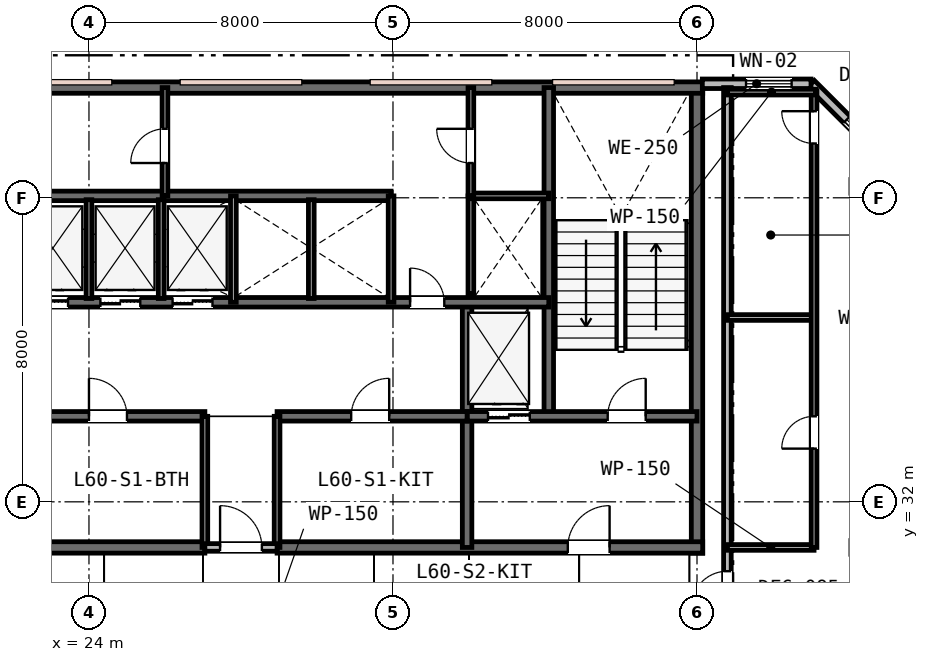
"""IFC4 building model, lengths in metres.
Left out: names, types, materials, properties, quantities, classifications, styles, units other than length and angle.
Written with IfcOpenShell. Run it as: python <this file> out.ifc"""

import sys

from ifc_helpers import new_model, si_unit, direction, frame, frame_2d, origin, place, context, subcontext, project, spatial, rectangle, extrude, element, fill, save


model = new_model("IFC4")
c1 = context("Model", 3, precision=1e-05, world=origin(), true_north=direction((0.0, 1.0)))
c2 = subcontext(c1, "Body", "Model", "MODEL_VIEW")
j1 = project(units=[si_unit("LENGTHUNIT", "METRE"), si_unit("PLANEANGLEUNIT", "RADIAN")], contexts=[c1])
p1 = place(None, origin())
s1 = spatial("IfcSite", under=j1, at=p1, CompositionType="ELEMENT")
p2 = place(p1, origin())
s2 = spatial("IfcBuilding", under=s1, at=p2, CompositionType="ELEMENT")
p3 = place(p2, frame((0.0, 0.0, 233.6)))
s3 = spatial("IfcBuildingStorey", under=s2, at=p3, CompositionType="ELEMENT", Elevation=233.6)
p4 = place(p3, frame((40.0, 30.65, 0.0), z_axis=(0.0, 0.0, 1.0), x_axis=(0.0, 1.0, 0.0)))
e1 = element("IfcWall", 1, at=p4, inside=s3, PredefinedType="SHEAR", context=c2, shape_type="SweptSolid", body=[
    extrude(rectangle(XDim=12.3, YDim=0.3, at=frame_2d((6.15, 0.0))), origin(), (0.0, 0.0, 1.0), 3.8),
])
p5 = place(p3, frame((15.85, 42.9, 0.0), z_axis=(0.0, 0.0, 1.0), x_axis=(1.0, 0.0, 0.0)))
e2 = element("IfcWall", 2, at=p5, inside=s3, PredefinedType="SHEAR", context=c2, shape_type="SweptSolid", body=[
    extrude(rectangle(XDim=24.3, YDim=0.3, at=frame_2d((12.15, 0.0))), origin(), (0.0, 0.0, 1.0), 3.8),
])
p6 = place(p3, frame((15.85, 30.8, 0.0), z_axis=(0.0, 0.0, 1.0), x_axis=(1.0, 0.0, 0.0)))
e3 = element("IfcWall", 3, at=p6, inside=s3, PredefinedType="SHEAR", context=c2, shape_type="SweptSolid", body=[
    extrude(rectangle(XDim=11.2, YDim=0.3, at=frame_2d((5.6, 0.0))), origin(), (0.0, 0.0, 1.0), 3.8),
])
p7 = place(p6, frame((2.45, 0.0, 0.0)))
e4 = element("IfcOpeningElement", 4, at=p7, cuts=e3, PredefinedType="OPENING", context=c2, shape_type="SweptSolid", body=[
    extrude(rectangle(XDim=1.1, YDim=2.15, at=frame_2d((0.55, 1.075))), frame((0.0, 0.16, 0.0), z_axis=(0.0, -1.0, 0.0), x_axis=(1.0, 0.0, 0.0)), (0.0, 0.0, 1.0), 0.32),
])
p8 = place(p3, frame((28.95, 30.8, 0.0), z_axis=(0.0, 0.0, 1.0), x_axis=(1.0, 0.0, 0.0)))
e5 = element("IfcWall", 5, at=p8, inside=s3, PredefinedType="SHEAR", context=c2, shape_type="SweptSolid", body=[
    extrude(rectangle(XDim=11.2, YDim=0.3, at=frame_2d((5.6, 0.0))), origin(), (0.0, 0.0, 1.0), 3.8),
])
p9 = place(p8, frame((7.65, 0.0, 0.0)))
e6 = element("IfcOpeningElement", 6, at=p9, cuts=e5, PredefinedType="OPENING", context=c2, shape_type="SweptSolid", body=[
    extrude(rectangle(XDim=1.1, YDim=2.15, at=frame_2d((0.55, 1.075))), frame((0.0, 0.16, 0.0), z_axis=(0.0, -1.0, 0.0), x_axis=(1.0, 0.0, 0.0)), (0.0, 0.0, 1.0), 0.32),
])
p10 = place(p3, frame((36.1, 34.25, 0.0), z_axis=(0.0, 0.0, 1.0), x_axis=(0.0, 1.0, 0.0)))
e7 = element("IfcWall", 7, at=p10, inside=s3, PredefinedType="SHEAR", context=c2, shape_type="SweptSolid", body=[
    extrude(rectangle(XDim=8.65, YDim=0.25, at=frame_2d((4.325, 0.0))), origin(), (0.0, 0.0, 1.0), 3.8),
])
p11 = place(p3, frame((33.95, 30.8, 0.0), z_axis=(0.0, 0.0, 1.0), x_axis=(0.0, 1.0, 0.0)))
e8 = element("IfcWall", 8, at=p11, inside=s3, PredefinedType="SHEAR", context=c2, shape_type="SweptSolid", body=[
    extrude(rectangle(XDim=6.45, YDim=0.25, at=frame_2d((3.225, 0.0))), origin(), (0.0, 0.0, 1.0), 3.8),
])
p12 = place(p3, frame((33.95, 34.25, 0.0), z_axis=(0.0, 0.0, 1.0), x_axis=(1.0, 0.0, 0.0)))
e9 = element("IfcWall", 9, at=p12, inside=s3, PredefinedType="SHEAR", context=c2, shape_type="SweptSolid", body=[
    extrude(rectangle(XDim=6.05, YDim=0.25, at=frame_2d((3.025, 0.0))), origin(), (0.0, 0.0, 1.0), 3.8),
])
p13 = place(p12, frame((3.7, 0.0, 0.0)))
e10 = element("IfcOpeningElement", 10, at=p13, cuts=e9, PredefinedType="OPENING", context=c2, shape_type="SweptSolid", body=[
    extrude(rectangle(XDim=1.0, YDim=2.15, at=frame_2d((0.5, 1.075))), frame((0.0, 0.135, 0.0), z_axis=(0.0, -1.0, 0.0), x_axis=(1.0, 0.0, 0.0)), (0.0, 0.0, 1.0), 0.27),
])
p14 = place(p12, frame((0.55, 0.0, 0.0)))
e11 = element("IfcOpeningElement", 11, at=p14, cuts=e9, PredefinedType="OPENING", context=c2, shape_type="SweptSolid", body=[
    extrude(rectangle(XDim=1.1, YDim=2.15, at=frame_2d((0.55, 1.075))), frame((0.0, 0.135, 0.0), z_axis=(0.0, -1.0, 0.0), x_axis=(1.0, 0.0, 0.0)), (0.0, 0.0, 1.0), 0.27),
])
p15 = place(p3, frame((22.05, 34.25, 0.0), z_axis=(0.0, 0.0, 1.0), x_axis=(1.0, 0.0, 0.0)))
e12 = element("IfcWall", 12, at=p15, inside=s3, PredefinedType="SHEAR", context=c2, shape_type="SweptSolid", body=[
    extrude(rectangle(XDim=5.0, YDim=0.25, at=frame_2d((2.5, 0.0))), origin(), (0.0, 0.0, 1.0), 3.8),
])
p16 = place(p15, frame((1.95, 0.0, 0.0)))
e13 = element("IfcOpeningElement", 13, at=p16, cuts=e12, PredefinedType="OPENING", context=c2, shape_type="SweptSolid", body=[
    extrude(rectangle(XDim=1.0, YDim=2.15, at=frame_2d((0.5, 1.075))), frame((0.0, 0.135, 0.0), z_axis=(0.0, -1.0, 0.0), x_axis=(1.0, 0.0, 0.0)), (0.0, 0.0, 1.0), 0.27),
])
p17 = place(p3, frame((28.95, 34.25, 0.0), z_axis=(0.0, 0.0, 1.0), x_axis=(1.0, 0.0, 0.0)))
e14 = element("IfcWall", 14, at=p17, inside=s3, PredefinedType="SHEAR", context=c2, shape_type="SweptSolid", body=[
    extrude(rectangle(XDim=5.0, YDim=0.25, at=frame_2d((2.5, 0.0))), origin(), (0.0, 0.0, 1.0), 3.8),
])
p18 = place(p17, frame((1.95, 0.0, 0.0)))
e15 = element("IfcOpeningElement", 15, at=p18, cuts=e14, PredefinedType="OPENING", context=c2, shape_type="SweptSolid", body=[
    extrude(rectangle(XDim=1.0, YDim=2.15, at=frame_2d((0.5, 1.075))), frame((0.0, 0.135, 0.0), z_axis=(0.0, -1.0, 0.0), x_axis=(1.0, 0.0, 0.0)), (0.0, 0.0, 1.0), 0.27),
])
p19 = place(p3, frame((19.9, 37.25, 0.0), z_axis=(0.0, 0.0, 1.0), x_axis=(1.0, 0.0, 0.0)))
e16 = element("IfcWall", 16, at=p19, inside=s3, PredefinedType="SHEAR", context=c2, shape_type="SweptSolid", body=[
    extrude(rectangle(XDim=16.2, YDim=0.25, at=frame_2d((8.1, 0.0))), origin(), (0.0, 0.0, 1.0), 3.8),
])
p20 = place(p19, frame((12.55, 0.0, 0.0)))
e17 = element("IfcOpeningElement", 17, at=p20, cuts=e16, PredefinedType="OPENING", context=c2, shape_type="SweptSolid", body=[
    extrude(rectangle(XDim=0.9, YDim=2.15, at=frame_2d((0.45, 1.075))), frame((0.0, 0.135, 0.0), z_axis=(0.0, -1.0, 0.0), x_axis=(1.0, 0.0, 0.0)), (0.0, 0.0, 1.0), 0.27),
])
p21 = place(p19, frame((2.5, 0.0, 0.0)))
e18 = element("IfcOpeningElement", 18, at=p21, cuts=e16, PredefinedType="OPENING", context=c2, shape_type="SweptSolid", body=[
    extrude(rectangle(XDim=1.05, YDim=2.15, at=frame_2d((0.525, 1.075))), frame((0.0, 0.135, 0.0), z_axis=(0.0, -1.0, 0.0), x_axis=(1.0, 0.0, 0.0)), (0.0, 0.0, 1.0), 0.27),
])
p22 = place(p19, frame((4.4, 0.0, 0.0)))
e19 = element("IfcOpeningElement", 19, at=p22, cuts=e16, PredefinedType="OPENING", context=c2, shape_type="SweptSolid", body=[
    extrude(rectangle(XDim=1.05, YDim=2.15, at=frame_2d((0.525, 1.075))), frame((0.0, 0.135, 0.0), z_axis=(0.0, -1.0, 0.0), x_axis=(1.0, 0.0, 0.0)), (0.0, 0.0, 1.0), 0.27),
])
p23 = place(p19, frame((6.3, 0.0, 0.0)))
e20 = element("IfcOpeningElement", 20, at=p23, cuts=e16, PredefinedType="OPENING", context=c2, shape_type="SweptSolid", body=[
    extrude(rectangle(XDim=1.05, YDim=2.15, at=frame_2d((0.525, 1.075))), frame((0.0, 0.135, 0.0), z_axis=(0.0, -1.0, 0.0), x_axis=(1.0, 0.0, 0.0)), (0.0, 0.0, 1.0), 0.27),
])
p24 = place(p3, frame((19.9, 40.05, 0.0), z_axis=(0.0, 0.0, 1.0), x_axis=(1.0, 0.0, 0.0)))
e21 = element("IfcWall", 21, at=p24, inside=s3, PredefinedType="SHEAR", context=c2, shape_type="SweptSolid", body=[
    extrude(rectangle(XDim=12.05, YDim=0.25, at=frame_2d((6.025, 0.0))), origin(), (0.0, 0.0, 1.0), 3.8),
])
p25 = place(p3, frame((46.0, 40.0, 0.0), z_axis=(0.0, 0.0, 1.0), x_axis=(-0.707106781187, 0.707106781187, 0.0)))
e22 = element("IfcWall", 22, at=p25, inside=s3, PredefinedType="STANDARD", context=c2, shape_type="SweptSolid", body=[
    extrude(rectangle(XDim=4.243, YDim=0.25, at=frame_2d((2.121, 0.0))), origin(), (0.0, 0.0, 1.0), 3.53),
])
p26 = place(p25, frame((1.111, 0.0, 0.75)))
e23 = element("IfcOpeningElement", 23, at=p26, cuts=e22, PredefinedType="OPENING", context=c2, shape_type="SweptSolid", body=[
    extrude(rectangle(XDim=1.8, YDim=1.85, at=frame_2d((0.9, 0.925))), frame((0.0, 0.135, 0.0), z_axis=(0.0, -1.0, 0.0), x_axis=(1.0, 0.0, 0.0)), (0.0, 0.0, 1.0), 0.27),
])
p27 = place(p3, frame((43.0, 43.0, 0.0), z_axis=(0.0, 0.0, 1.0), x_axis=(-1.0, 0.0, 0.0)))
e24 = element("IfcWall", 24, at=p27, inside=s3, PredefinedType="STANDARD", context=c2, shape_type="SweptSolid", body=[
    extrude(rectangle(XDim=2.86, YDim=0.25, at=frame_2d((1.43, 0.0))), origin(), (0.0, 0.0, 1.0), 3.53),
])
p28 = place(p27, frame((0.51, 0.0, 0.85)))
e25 = element("IfcOpeningElement", 25, at=p28, cuts=e24, PredefinedType="OPENING", context=c2, shape_type="SweptSolid", body=[
    extrude(rectangle(XDim=1.2, YDim=1.6, at=frame_2d((0.6, 0.8))), frame((0.0, 0.135, 0.0), z_axis=(0.0, -1.0, 0.0), x_axis=(1.0, 0.0, 0.0)), (0.0, 0.0, 1.0), 0.27),
])
for number, where, z_axis, x_axis in (
    (26, (27.05, 30.8, 0.0), (0.0, 0.0, 1.0), (0.0, 1.0, 0.0)),
    (27, (28.95, 30.8, 0.0), (0.0, 0.0, 1.0), (0.0, 1.0, 0.0)),
):
    element("IfcWall", number, at=place(p3, frame(where, z_axis=z_axis, x_axis=x_axis)), inside=s3, PredefinedType="PLUMBINGWALL", context=c2, shape_type="SweptSolid", body=[
        extrude(rectangle(XDim=3.45, YDim=0.15, at=frame_2d((1.725, 0.0))), origin(), (0.0, 0.0, 1.0), 3.22),
    ])
p29 = place(p3, frame((27.05, 30.8, 0.0), z_axis=(0.0, 0.0, 1.0), x_axis=(1.0, 0.0, 0.0)))
e28 = element("IfcWall", 28, at=p29, inside=s3, PredefinedType="PARTITIONING", context=c2, shape_type="SweptSolid", body=[
    extrude(rectangle(XDim=1.9, YDim=0.2, at=frame_2d((0.95, 0.0))), origin(), (0.0, 0.0, 1.0), 3.22),
])
p30 = place(p29, frame((0.4, 0.0, 0.0)))
e29 = element("IfcOpeningElement", 29, at=p30, cuts=e28, PredefinedType="OPENING", context=c2, shape_type="SweptSolid", body=[
    extrude(rectangle(XDim=1.1, YDim=2.15, at=frame_2d((0.55, 1.075))), frame((0.0, 0.11, 0.0), z_axis=(0.0, -1.0, 0.0), x_axis=(1.0, 0.0, 0.0)), (0.0, 0.0, 1.0), 0.22),
])
p31 = place(p3, frame((27.8, 37.25, 0.0), z_axis=(0.0, 0.0, 1.0), x_axis=(0.0, 1.0, 0.0)))
e30 = element("IfcWall", 30, at=p31, inside=s3, PredefinedType="PLUMBINGWALL", context=c2, shape_type="SweptSolid", body=[
    extrude(rectangle(XDim=2.8, YDim=0.15, at=frame_2d((1.4, 0.0))), origin(), (0.0, 0.0, 1.0), 3.53),
])
for number, where, z_axis, x_axis in (
    (31, (24.0, 37.35, 0.0), (0.0, 0.0, 1.0), (0.0, 1.0, 0.0)),
    (32, (25.9, 37.35, 0.0), (0.0, 0.0, 1.0), (0.0, 1.0, 0.0)),
):
    element("IfcWall", number, at=place(p3, frame(where, z_axis=z_axis, x_axis=x_axis)), inside=s3, PredefinedType="PLUMBINGWALL", context=c2, shape_type="SweptSolid", body=[
        extrude(rectangle(XDim=2.6, YDim=0.15, at=frame_2d((1.3, 0.0))), origin(), (0.0, 0.0, 1.0), 3.53),
    ])
p32 = place(p3, frame((31.95, 37.25, 0.0), z_axis=(0.0, 0.0, 1.0), x_axis=(0.0, 1.0, 0.0)))
e33 = element("IfcWall", 33, at=p32, inside=s3, PredefinedType="PLUMBINGWALL", context=c2, shape_type="SweptSolid", body=[
    extrude(rectangle(XDim=2.8, YDim=0.15, at=frame_2d((1.4, 0.0))), origin(), (0.0, 0.0, 1.0), 3.53),
])
p33 = place(p3, frame((29.85, 37.35, 0.0), z_axis=(0.0, 0.0, 1.0), x_axis=(0.0, 1.0, 0.0)))
e34 = element("IfcWall", 34, at=p33, inside=s3, PredefinedType="PLUMBINGWALL", context=c2, shape_type="SweptSolid", body=[
    extrude(rectangle(XDim=2.6, YDim=0.15, at=frame_2d((1.3, 0.0))), origin(), (0.0, 0.0, 1.0), 3.53),
])
p34 = place(p3, frame((34.05, 37.473, 0.0), z_axis=(0.0, 0.0, 1.0), x_axis=(0.0, 1.0, 0.0)))
e35 = element("IfcWall", 35, at=p34, inside=s3, PredefinedType="PLUMBINGWALL", context=c2, shape_type="SweptSolid", body=[
    extrude(rectangle(XDim=2.577, YDim=0.15, at=frame_2d((1.288, 0.0))), origin(), (0.0, 0.0, 1.0), 3.53),
])
p35 = place(p3, frame((34.05, 40.05, 0.0), z_axis=(0.0, 0.0, 1.0), x_axis=(1.0, 0.0, 0.0)))
e36 = element("IfcWall", 36, at=p35, inside=s3, PredefinedType="PARTITIONING", context=c2, shape_type="SweptSolid", body=[
    extrude(rectangle(XDim=2.05, YDim=0.15, at=frame_2d((1.025, 0.0))), origin(), (0.0, 0.0, 1.0), 3.53),
])
p36 = place(p3, frame((34.05, 40.05, 0.0), z_axis=(0.0, 0.0, 1.0), x_axis=(0.0, 1.0, 0.0)))
e37 = element("IfcWall", 37, at=p36, inside=s3, PredefinedType="PARTITIONING", context=c2, shape_type="SweptSolid", body=[
    extrude(rectangle(XDim=2.85, YDim=0.15, at=frame_2d((1.425, 0.0))), origin(), (0.0, 0.0, 1.0), 3.53),
])
p37 = place(p36, frame((0.865, 0.0, 0.0)))
e38 = element("IfcOpeningElement", 38, at=p37, cuts=e37, PredefinedType="OPENING", context=c2, shape_type="SweptSolid", body=[
    extrude(rectangle(XDim=0.9, YDim=2.15, at=frame_2d((0.45, 1.075))), frame((0.0, 0.085, 0.0), z_axis=(0.0, -1.0, 0.0), x_axis=(1.0, 0.0, 0.0)), (0.0, 0.0, 1.0), 0.17),
])
p38 = place(p3, frame((26.0, 40.05, 0.0), z_axis=(0.0, 0.0, 1.0), x_axis=(0.0, 1.0, 0.0)))
e39 = element("IfcWall", 39, at=p38, inside=s3, PredefinedType="PARTITIONING", context=c2, shape_type="SweptSolid", body=[
    extrude(rectangle(XDim=2.85, YDim=0.15, at=frame_2d((1.425, 0.0))), origin(), (0.0, 0.0, 1.0), 3.53),
])
p39 = place(p38, frame((0.865, 0.0, 0.0)))
e40 = element("IfcOpeningElement", 40, at=p39, cuts=e39, PredefinedType="OPENING", context=c2, shape_type="SweptSolid", body=[
    extrude(rectangle(XDim=0.9, YDim=2.15, at=frame_2d((0.45, 1.075))), frame((0.0, 0.085, 0.0), z_axis=(0.0, -1.0, 0.0), x_axis=(1.0, 0.0, 0.0)), (0.0, 0.0, 1.0), 0.17),
])
p40 = place(p3, frame((40.8, 28.6, 0.0), z_axis=(0.0, 0.0, 1.0), x_axis=(0.0, 1.0, 0.0)))
e41 = element("IfcWall", 41, at=p40, inside=s3, PredefinedType="PARTITIONING", context=c2, shape_type="SweptSolid", body=[
    extrude(rectangle(XDim=14.3, YDim=0.2, at=frame_2d((7.15, 0.0))), origin(), (0.0, 0.0, 1.0), 2.92),
])
p41 = place(p40, frame((0.625, 0.0, 0.0)))
e42 = element("IfcOpeningElement", 42, at=p41, cuts=e41, PredefinedType="OPENING", context=c2, shape_type="SweptSolid", body=[
    extrude(rectangle(XDim=0.95, YDim=2.15, at=frame_2d((0.475, 1.075))), frame((0.0, 0.11, 0.0), z_axis=(0.0, -1.0, 0.0), x_axis=(1.0, 0.0, 0.0)), (0.0, 0.0, 1.0), 0.22),
])
p42 = place(p3, frame((40.8, 30.8, 0.0), z_axis=(0.0, 0.0, 1.0), x_axis=(1.0, 0.0, 0.0)))
e43 = element("IfcWall", 43, at=p42, inside=s3, PredefinedType="PARTITIONING", context=c2, shape_type="SweptSolid", body=[
    extrude(rectangle(XDim=2.28, YDim=0.15, at=frame_2d((1.14, 0.0))), origin(), (0.0, 0.0, 1.0), 2.92),
])
p43 = place(p3, frame((40.8, 36.85, 0.0), z_axis=(0.0, 0.0, 1.0), x_axis=(1.0, 0.0, 0.0)))
e44 = element("IfcWall", 44, at=p43, inside=s3, PredefinedType="PARTITIONING", context=c2, shape_type="SweptSolid", body=[
    extrude(rectangle(XDim=2.28, YDim=0.15, at=frame_2d((1.14, 0.0))), origin(), (0.0, 0.0, 1.0), 3.53),
])
p44 = place(p3, frame((43.08, 30.8, 0.0), z_axis=(0.0, 0.0, 1.0), x_axis=(0.0, 1.0, 0.0)))
e45 = element("IfcWall", 45, at=p44, inside=s3, PredefinedType="PARTITIONING", context=c2, shape_type="SweptSolid", body=[
    extrude(rectangle(XDim=12.02, YDim=0.15, at=frame_2d((6.01, 0.0))), origin(), (0.0, 0.0, 1.0), 2.92),
])
p45 = place(p44, frame((2.6, 0.0, 0.0)))
e46 = element("IfcOpeningElement", 46, at=p45, cuts=e45, PredefinedType="OPENING", context=c2, shape_type="SweptSolid", body=[
    extrude(rectangle(XDim=0.85, YDim=2.15, at=frame_2d((0.425, 1.075))), frame((0.0, 0.085, 0.0), z_axis=(0.0, -1.0, 0.0), x_axis=(1.0, 0.0, 0.0)), (0.0, 0.0, 1.0), 0.17),
])
p46 = place(p44, frame((10.629, 0.0, 0.0)))
e47 = element("IfcOpeningElement", 47, at=p46, cuts=e45, PredefinedType="OPENING", context=c2, shape_type="SweptSolid", body=[
    extrude(rectangle(XDim=0.85, YDim=2.15, at=frame_2d((0.425, 1.075))), frame((0.0, 0.085, 0.0), z_axis=(0.0, -1.0, 0.0), x_axis=(1.0, 0.0, 0.0)), (0.0, 0.0, 1.0), 0.17),
])
p47 = place(p3, frame((40.8, 42.78, 0.0), z_axis=(0.0, 0.0, 1.0), x_axis=(1.0, 0.0, 0.0)))
e48 = element("IfcWall", 48, at=p47, inside=s3, PredefinedType="PARTITIONING", context=c2, shape_type="SweptSolid", body=[
    extrude(rectangle(XDim=2.32, YDim=0.15, at=frame_2d((1.16, 0.0))), origin(), (0.0, 0.0, 1.0), 3.53),
])
p48 = place(p26, origin())
e49 = element("IfcWindow", 49, at=p48, inside=s3, PartitioningType="SINGLE_PANEL", PredefinedType="WINDOW", context=c2, shape_type="SweptSolid", body=[
    extrude(rectangle(XDim=1.8, YDim=1.85, at=frame_2d((0.9, 0.925))), frame((0.0, 0.03, 0.0), z_axis=(0.0, -1.0, 0.0), x_axis=(1.0, 0.0, 0.0)), (0.0, 0.0, 1.0), 0.06),
])
fill(e23, e49)
p49 = place(p28, origin())
e50 = element("IfcWindow", 50, at=p49, inside=s3, PartitioningType="SINGLE_PANEL", PredefinedType="WINDOW", context=c2, shape_type="SweptSolid", body=[
    extrude(rectangle(XDim=1.2, YDim=1.6, at=frame_2d((0.6, 0.8))), frame((0.0, 0.03, 0.0), z_axis=(0.0, -1.0, 0.0), x_axis=(1.0, 0.0, 0.0)), (0.0, 0.0, 1.0), 0.06),
])
fill(e25, e50)
p50 = place(p30, origin())
e51 = element("IfcDoor", 51, at=p50, inside=s3, OperationType="SINGLE_SWING_LEFT", PredefinedType="DOOR", context=c2, shape_type="SweptSolid", body=[
    extrude(rectangle(XDim=1.1, YDim=2.15, at=frame_2d((0.55, 1.075))), frame((0.0, 0.025, 0.0), z_axis=(0.0, -1.0, 0.0), x_axis=(1.0, 0.0, 0.0)), (0.0, 0.0, 1.0), 0.05),
])
fill(e29, e51)
p51 = place(p13, origin())
e52 = element("IfcDoor", 52, at=p51, inside=s3, OperationType="SINGLE_SWING_RIGHT", PredefinedType="DOOR", context=c2, shape_type="SweptSolid", body=[
    extrude(rectangle(XDim=1.0, YDim=2.15, at=frame_2d((0.5, 1.075))), frame((0.0, 0.025, 0.0), z_axis=(0.0, -1.0, 0.0), x_axis=(1.0, 0.0, 0.0)), (0.0, 0.0, 1.0), 0.05),
])
fill(e10, e52)
p52 = place(p9, origin())
e53 = element("IfcDoor", 53, at=p52, inside=s3, OperationType="SINGLE_SWING_RIGHT", PredefinedType="DOOR", context=c2, shape_type="SweptSolid", body=[
    extrude(rectangle(XDim=1.1, YDim=2.15, at=frame_2d((0.55, 1.075))), frame((0.0, 0.025, 0.0), z_axis=(0.0, -1.0, 0.0), x_axis=(1.0, 0.0, 0.0)), (0.0, 0.0, 1.0), 0.05),
])
fill(e6, e53)
p53 = place(p16, origin())
e54 = element("IfcDoor", 54, at=p53, inside=s3, OperationType="SINGLE_SWING_LEFT", PredefinedType="DOOR", context=c2, shape_type="SweptSolid", body=[
    extrude(rectangle(XDim=1.0, YDim=2.15, at=frame_2d((0.5, 1.075))), frame((0.0, 0.025, 0.0), z_axis=(0.0, -1.0, 0.0), x_axis=(1.0, 0.0, 0.0)), (0.0, 0.0, 1.0), 0.05),
])
fill(e13, e54)
p54 = place(p18, origin())
e55 = element("IfcDoor", 55, at=p54, inside=s3, OperationType="SINGLE_SWING_RIGHT", PredefinedType="DOOR", context=c2, shape_type="SweptSolid", body=[
    extrude(rectangle(XDim=1.0, YDim=2.15, at=frame_2d((0.5, 1.075))), frame((0.0, 0.025, 0.0), z_axis=(0.0, -1.0, 0.0), x_axis=(1.0, 0.0, 0.0)), (0.0, 0.0, 1.0), 0.05),
])
fill(e15, e55)
p55 = place(p20, origin())
e56 = element("IfcDoor", 56, at=p55, inside=s3, OperationType="SINGLE_SWING_LEFT", PredefinedType="DOOR", context=c2, shape_type="SweptSolid", body=[
    extrude(rectangle(XDim=0.9, YDim=2.15, at=frame_2d((0.45, 1.075))), frame((0.0, 0.025, 0.0), z_axis=(0.0, -1.0, 0.0), x_axis=(1.0, 0.0, 0.0)), (0.0, 0.0, 1.0), 0.05),
])
fill(e17, e56)
p56 = place(p37, origin())
e57 = element("IfcDoor", 57, at=p56, inside=s3, OperationType="SINGLE_SWING_RIGHT", PredefinedType="DOOR", context=c2, shape_type="SweptSolid", body=[
    extrude(rectangle(XDim=0.9, YDim=2.15, at=frame_2d((0.45, 1.075))), frame((0.0, 0.025, 0.0), z_axis=(0.0, -1.0, 0.0), x_axis=(1.0, 0.0, 0.0)), (0.0, 0.0, 1.0), 0.05),
])
fill(e38, e57)
p57 = place(p39, origin())
e58 = element("IfcDoor", 58, at=p57, inside=s3, OperationType="SINGLE_SWING_LEFT", PredefinedType="DOOR", context=c2, shape_type="SweptSolid", body=[
    extrude(rectangle(XDim=0.9, YDim=2.15, at=frame_2d((0.45, 1.075))), frame((0.0, 0.025, 0.0), z_axis=(0.0, -1.0, 0.0), x_axis=(1.0, 0.0, 0.0)), (0.0, 0.0, 1.0), 0.05),
])
fill(e40, e58)
p58 = place(p41, origin())
e59 = element("IfcDoor", 59, at=p58, inside=s3, OperationType="SINGLE_SWING_LEFT", PredefinedType="DOOR", context=c2, shape_type="SweptSolid", body=[
    extrude(rectangle(XDim=0.95, YDim=2.15, at=frame_2d((0.475, 1.075))), frame((0.0, 0.025, 0.0), z_axis=(0.0, -1.0, 0.0), x_axis=(1.0, 0.0, 0.0)), (0.0, 0.0, 1.0), 0.05),
])
fill(e42, e59)
p59 = place(p45, origin())
e60 = element("IfcDoor", 60, at=p59, inside=s3, OperationType="SINGLE_SWING_LEFT", PredefinedType="DOOR", context=c2, shape_type="SweptSolid", body=[
    extrude(rectangle(XDim=0.85, YDim=2.15, at=frame_2d((0.425, 1.075))), frame((0.0, 0.025, 0.0), z_axis=(0.0, -1.0, 0.0), x_axis=(1.0, 0.0, 0.0)), (0.0, 0.0, 1.0), 0.05),
])
fill(e46, e60)
p60 = place(p46, origin())
e61 = element("IfcDoor", 61, at=p60, inside=s3, OperationType="SINGLE_SWING_RIGHT", PredefinedType="DOOR", context=c2, shape_type="SweptSolid", body=[
    extrude(rectangle(XDim=0.85, YDim=2.15, at=frame_2d((0.425, 1.075))), frame((0.0, 0.025, 0.0), z_axis=(0.0, -1.0, 0.0), x_axis=(1.0, 0.0, 0.0)), (0.0, 0.0, 1.0), 0.05),
])
fill(e47, e61)
p61 = place(p14, origin())
e62 = element("IfcDoor", 62, at=p61, inside=s3, OperationType="DOUBLE_DOOR_SLIDING", PredefinedType="DOOR", context=c2, shape_type="SweptSolid", body=[
    extrude(rectangle(XDim=1.1, YDim=2.15, at=frame_2d((0.55, 1.075))), frame((0.0, 0.025, 0.0), z_axis=(0.0, -1.0, 0.0), x_axis=(1.0, 0.0, 0.0)), (0.0, 0.0, 1.0), 0.05),
])
fill(e11, e62)
p62 = place(p21, origin())
e63 = element("IfcDoor", 63, at=p62, inside=s3, OperationType="DOUBLE_DOOR_SLIDING", PredefinedType="DOOR", context=c2, shape_type="SweptSolid", body=[
    extrude(rectangle(XDim=1.05, YDim=2.15, at=frame_2d((0.525, 1.075))), frame((0.0, 0.025, 0.0), z_axis=(0.0, -1.0, 0.0), x_axis=(1.0, 0.0, 0.0)), (0.0, 0.0, 1.0), 0.05),
])
fill(e18, e63)
p63 = place(p22, origin())
e64 = element("IfcDoor", 64, at=p63, inside=s3, OperationType="DOUBLE_DOOR_SLIDING", PredefinedType="DOOR", context=c2, shape_type="SweptSolid", body=[
    extrude(rectangle(XDim=1.05, YDim=2.15, at=frame_2d((0.525, 1.075))), frame((0.0, 0.025, 0.0), z_axis=(0.0, -1.0, 0.0), x_axis=(1.0, 0.0, 0.0)), (0.0, 0.0, 1.0), 0.05),
])
fill(e19, e64)
p64 = place(p23, origin())
e65 = element("IfcDoor", 65, at=p64, inside=s3, OperationType="DOUBLE_DOOR_SLIDING", PredefinedType="DOOR", context=c2, shape_type="SweptSolid", body=[
    extrude(rectangle(XDim=1.05, YDim=2.15, at=frame_2d((0.525, 1.075))), frame((0.0, 0.025, 0.0), z_axis=(0.0, -1.0, 0.0), x_axis=(1.0, 0.0, 0.0)), (0.0, 0.0, 1.0), 0.05),
])
fill(e20, e65)
save(model, sys.argv[1])
